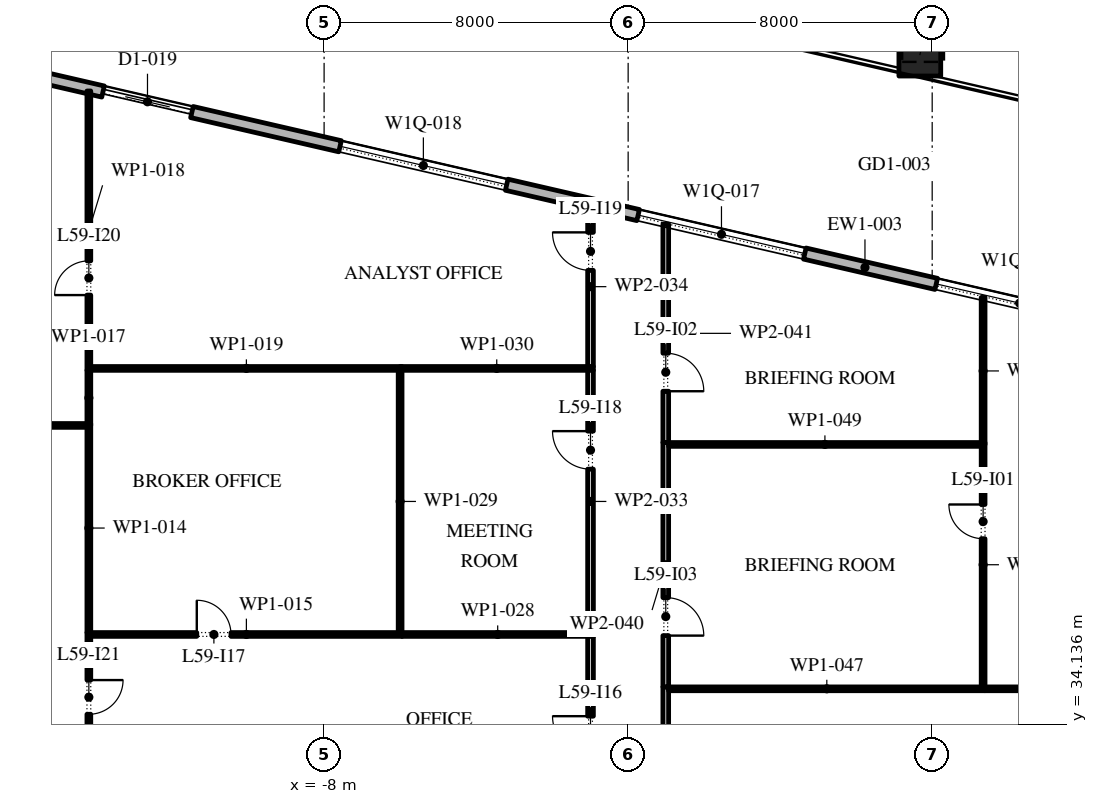
"""IFC4 building model, lengths in metres.
Left out: names, types, materials, properties, quantities, classifications, styles, units other than length and angle.
Written with IfcOpenShell. Run it as: python <this file> out.ifc"""

import sys

from ifc_helpers import new_model, si_unit, direction, frame, frame_2d, origin, origin_2d, place, context, subcontext, project, spatial, rectangle, extrude, element, fill, save


model = new_model("IFC4")
c1 = context("Model", 3, precision=1e-05, world=origin(), true_north=direction((0.0, 1.0)))
c2 = subcontext(c1, "Body", "Model", "MODEL_VIEW")
j1 = project(units=[si_unit("LENGTHUNIT", "METRE"), si_unit("PLANEANGLEUNIT", "RADIAN")], contexts=[c1])
p1 = place(None, origin())
s1 = spatial("IfcSite", under=j1, at=p1, CompositionType="ELEMENT")
p2 = place(p1, origin())
s2 = spatial("IfcBuilding", under=s1, at=p2, CompositionType="ELEMENT")
p3 = place(p2, frame((0.0, 0.0, 272.4)))
s3 = spatial("IfcBuildingStorey", under=s2, at=p3, CompositionType="ELEMENT", Elevation=272.4)
p4 = place(p3, frame((7.675, 51.744, 0.0), z_axis=(0.02037631848, 0.088220197057, 0.99589256573), x_axis=(-0.97434807649, 0.225046274885, 0.0)))
e1 = element("IfcColumn", 1, at=p4, inside=s3, PredefinedType="COLUMN", context=c2, shape_type="SweptSolid", body=[
    extrude(rectangle(XDim=1.1, YDim=1.1, at=origin_2d()), origin(), (0.0, 0.0, 1.0), 4.218),
])
p5 = place(p3, frame((29.616, 40.758, 0.0), z_axis=(0.0, 0.0, 1.0), x_axis=(-0.974370532314, 0.224949029246, 0.0)))
e2 = element("IfcWall", 2, at=p5, inside=s3, PredefinedType="STANDARD", context=c2, shape_type="SweptSolid", body=[
    extrude(rectangle(XDim=48.0, YDim=0.3, at=frame_2d((24.0, 0.0))), origin(), (0.0, 0.0, 1.0), 4.0),
])
p6 = place(p5, frame((1.625, 0.0, 0.45)))
e3 = element("IfcOpeningElement", 3, at=p6, cuts=e2, PredefinedType="OPENING", context=c2, shape_type="SweptSolid", body=[
    extrude(rectangle(XDim=4.5, YDim=2.575, at=frame_2d((2.25, 1.288))), frame((0.0, 0.16, 0.0), z_axis=(0.0, -1.0, 0.0), x_axis=(1.0, 0.0, 0.0)), (0.0, 0.0, 1.0), 0.32),
])
p7 = place(p5, frame((10.575, 0.0, 0.0)))
e4 = element("IfcOpeningElement", 4, at=p7, cuts=e2, PredefinedType="OPENING", context=c2, shape_type="SweptSolid", body=[
    extrude(rectangle(XDim=2.4, YDim=3.5, at=frame_2d((1.2, 1.75))), frame((0.0, 0.16, 0.0), z_axis=(0.0, -1.0, 0.0), x_axis=(1.0, 0.0, 0.0)), (0.0, 0.0, 1.0), 0.32),
])
p8 = place(p5, frame((17.575, 0.0, 0.45)))
e5 = element("IfcOpeningElement", 5, at=p8, cuts=e2, PredefinedType="OPENING", context=c2, shape_type="SweptSolid", body=[
    extrude(rectangle(XDim=4.5, YDim=2.45, at=frame_2d((2.25, 1.225))), frame((0.0, 0.16, 0.0), z_axis=(0.0, -1.0, 0.0), x_axis=(1.0, 0.0, 0.0)), (0.0, 0.0, 1.0), 0.32),
])
p9 = place(p5, frame((25.625, 0.0, 0.45)))
e6 = element("IfcOpeningElement", 6, at=p9, cuts=e2, PredefinedType="OPENING", context=c2, shape_type="SweptSolid", body=[
    extrude(rectangle(XDim=4.5, YDim=2.45, at=frame_2d((2.25, 1.225))), frame((0.0, 0.16, 0.0), z_axis=(0.0, -1.0, 0.0), x_axis=(1.0, 0.0, 0.0)), (0.0, 0.0, 1.0), 0.32),
])
p10 = place(p5, frame((33.675, 0.0, 0.45)))
e7 = element("IfcOpeningElement", 7, at=p10, cuts=e2, PredefinedType="OPENING", context=c2, shape_type="SweptSolid", body=[
    extrude(rectangle(XDim=4.5, YDim=2.45, at=frame_2d((2.25, 1.225))), frame((0.0, 0.16, 0.0), z_axis=(0.0, -1.0, 0.0), x_axis=(1.0, 0.0, 0.0)), (0.0, 0.0, 1.0), 0.32),
])
p11 = place(p5, frame((42.175, 0.0, 0.0)))
e8 = element("IfcOpeningElement", 8, at=p11, cuts=e2, PredefinedType="OPENING", context=c2, shape_type="SweptSolid", body=[
    extrude(rectangle(XDim=2.4, YDim=3.5, at=frame_2d((1.2, 1.75))), frame((0.0, 0.16, 0.0), z_axis=(0.0, -1.0, 0.0), x_axis=(1.0, 0.0, 0.0)), (0.0, 0.0, 1.0), 0.32),
])
p12 = place(p3, frame((-14.19, 30.7, 0.0), z_axis=(0.0, 0.0, 1.0), x_axis=(0.0, 1.0, 0.0)))
e9 = element("IfcWall", 9, at=p12, inside=s3, PredefinedType="PARTITIONING", context=c2, shape_type="SweptSolid", body=[
    extrude(rectangle(XDim=5.85, YDim=0.1, at=frame_2d((2.925, 0.0))), origin(), (0.0, 0.0, 1.0), 4.0),
])
p13 = place(p12, frame((3.7, 0.0, 0.0)))
e10 = element("IfcOpeningElement", 10, at=p13, cuts=e9, PredefinedType="OPENING", context=c2, shape_type="SweptSolid", body=[
    extrude(rectangle(XDim=0.9, YDim=2.1, at=frame_2d((0.45, 1.05))), frame((0.0, 0.06, 0.0), z_axis=(0.0, -1.0, 0.0), x_axis=(1.0, 0.0, 0.0)), (0.0, 0.0, 1.0), 0.12),
])
p14 = place(p3, frame((-14.19, 36.55, 0.0), z_axis=(0.0, 0.0, 1.0), x_axis=(0.0, 1.0, 0.0)))
e11 = element("IfcWall", 11, at=p14, inside=s3, PredefinedType="PARTITIONING", context=c2, shape_type="SweptSolid", body=[
    extrude(rectangle(XDim=5.5, YDim=0.1, at=frame_2d((2.75, 0.0))), origin(), (0.0, 0.0, 1.0), 4.0),
])
p15 = place(p3, frame((-14.14, 36.5, 0.0), z_axis=(0.0, 0.0, 1.0), x_axis=(1.0, 0.0, 0.0)))
e12 = element("IfcWall", 12, at=p15, inside=s3, PredefinedType="PARTITIONING", context=c2, shape_type="SweptSolid", body=[
    extrude(rectangle(XDim=8.19, YDim=0.1, at=frame_2d((4.095, 0.0))), origin(), (0.0, 0.0, 1.0), 4.0),
])
p16 = place(p15, frame((2.79, 0.0, 0.0)))
e13 = element("IfcOpeningElement", 13, at=p16, cuts=e12, PredefinedType="OPENING", context=c2, shape_type="SweptSolid", body=[
    extrude(rectangle(XDim=0.9, YDim=2.1, at=frame_2d((0.45, 1.05))), frame((0.0, 0.06, 0.0), z_axis=(0.0, -1.0, 0.0), x_axis=(1.0, 0.0, 0.0)), (0.0, 0.0, 1.0), 0.12),
])
p17 = place(p3, frame((-14.24, 42.0, 0.0), z_axis=(0.0, 0.0, 1.0), x_axis=(-1.0, 0.0, 0.0)))
e14 = element("IfcWall", 14, at=p17, inside=s3, PredefinedType="PARTITIONING", context=c2, shape_type="SweptSolid", body=[
    extrude(rectangle(XDim=8.589, YDim=0.1, at=frame_2d((4.294, 0.0))), origin(), (0.0, 0.0, 1.0), 4.0),
])
p18 = place(p3, frame((-14.19, 42.0, 0.0), z_axis=(0.0, 0.0, 1.0), x_axis=(0.0, 1.0, 0.0)))
e15 = element("IfcWall", 15, at=p18, inside=s3, PredefinedType="PARTITIONING", context=c2, shape_type="SweptSolid", body=[
    extrude(rectangle(XDim=1.45, YDim=0.1, at=frame_2d((0.725, 0.0))), origin(), (0.0, 0.0, 1.0), 4.0),
])
p19 = place(p3, frame((-14.19, 43.45, 0.0), z_axis=(0.0, 0.0, 1.0), x_axis=(0.0, 1.0, 0.0)))
e16 = element("IfcWall", 16, at=p19, inside=s3, PredefinedType="PARTITIONING", context=c2, shape_type="SweptSolid", body=[
    extrude(rectangle(XDim=7.35, YDim=0.1, at=frame_2d((3.675, 0.0))), origin(), (0.0, 0.0, 1.0), 4.0),
])
p20 = place(p19, frame((1.98, 0.0, 0.0)))
e17 = element("IfcOpeningElement", 17, at=p20, cuts=e16, PredefinedType="OPENING", context=c2, shape_type="SweptSolid", body=[
    extrude(rectangle(XDim=0.9, YDim=2.1, at=frame_2d((0.45, 1.05))), frame((0.0, 0.06, 0.0), z_axis=(0.0, -1.0, 0.0), x_axis=(1.0, 0.0, 0.0)), (0.0, 0.0, 1.0), 0.12),
])
p21 = place(p3, frame((-14.14, 43.5, 0.0), z_axis=(0.0, 0.0, 1.0), x_axis=(1.0, 0.0, 0.0)))
e18 = element("IfcWall", 18, at=p21, inside=s3, PredefinedType="PARTITIONING", context=c2, shape_type="SweptSolid", body=[
    extrude(rectangle(XDim=8.19, YDim=0.1, at=frame_2d((4.095, 0.0))), origin(), (0.0, 0.0, 1.0), 4.0),
])
p22 = place(p3, frame((-5.95, 36.5, 0.0), z_axis=(0.0, 0.0, 1.0), x_axis=(1.0, 0.0, 0.0)))
e19 = element("IfcWall", 19, at=p22, inside=s3, PredefinedType="PARTITIONING", context=c2, shape_type="SweptSolid", body=[
    extrude(rectangle(XDim=5.035, YDim=0.1, at=frame_2d((2.518, 0.0))), origin(), (0.0, 0.0, 1.0), 4.0),
])
p23 = place(p3, frame((-6.0, 43.45, 0.0), z_axis=(0.0, 0.0, 1.0), x_axis=(0.0, -1.0, 0.0)))
e20 = element("IfcWall", 20, at=p23, inside=s3, PredefinedType="PARTITIONING", context=c2, shape_type="SweptSolid", body=[
    extrude(rectangle(XDim=6.9, YDim=0.1, at=frame_2d((3.45, 0.0))), origin(), (0.0, 0.0, 1.0), 4.0),
])
p24 = place(p3, frame((-6.0, 43.5, 0.0), z_axis=(0.0, 0.0, 1.0), x_axis=(1.0, 0.0, 0.0)))
e21 = element("IfcWall", 21, at=p24, inside=s3, PredefinedType="PARTITIONING", context=c2, shape_type="SweptSolid", body=[
    extrude(rectangle(XDim=5.085, YDim=0.1, at=frame_2d((2.542, 0.0))), origin(), (0.0, 0.0, 1.0), 4.0),
])
p25 = place(p3, frame((-0.99, 29.71, 0.0), z_axis=(0.0, 0.0, 1.0), x_axis=(0.0, 1.0, 0.0)))
e22 = element("IfcWall", 22, at=p25, inside=s3, PredefinedType="PARTITIONING", context=c2, shape_type="SweptSolid", body=[
    extrude(rectangle(XDim=6.74, YDim=0.15, at=frame_2d((3.37, 0.0))), origin(), (0.0, 0.0, 1.0), 4.0),
])
p26 = place(p25, frame((3.64, 0.0, 0.0)))
e23 = element("IfcOpeningElement", 23, at=p26, cuts=e22, PredefinedType="OPENING", context=c2, shape_type="SweptSolid", body=[
    extrude(rectangle(XDim=1.0, YDim=2.1, at=frame_2d((0.5, 1.05))), frame((0.0, 0.085, 0.0), z_axis=(0.0, -1.0, 0.0), x_axis=(1.0, 0.0, 0.0)), (0.0, 0.0, 1.0), 0.17),
])
p27 = place(p3, frame((-0.99, 36.55, 0.0), z_axis=(0.0, 0.0, 1.0), x_axis=(0.0, 1.0, 0.0)))
e24 = element("IfcWall", 24, at=p27, inside=s3, PredefinedType="PARTITIONING", context=c2, shape_type="SweptSolid", body=[
    extrude(rectangle(XDim=6.9, YDim=0.15, at=frame_2d((3.45, 0.0))), origin(), (0.0, 0.0, 1.0), 4.0),
])
p28 = place(p27, frame((4.3, 0.0, 0.0)))
e25 = element("IfcOpeningElement", 25, at=p28, cuts=e24, PredefinedType="OPENING", context=c2, shape_type="SweptSolid", body=[
    extrude(rectangle(XDim=1.0, YDim=2.1, at=frame_2d((0.5, 1.05))), frame((0.0, 0.085, 0.0), z_axis=(0.0, -1.0, 0.0), x_axis=(1.0, 0.0, 0.0)), (0.0, 0.0, 1.0), 0.17),
])
p29 = place(p3, frame((-0.99, 43.55, 0.0), z_axis=(0.0, 0.0, 1.0), x_axis=(0.0, 1.0, 0.0)))
e26 = element("IfcWall", 26, at=p29, inside=s3, PredefinedType="PARTITIONING", context=c2, shape_type="SweptSolid", body=[
    extrude(rectangle(XDim=4.203, YDim=0.15, at=frame_2d((2.102, 0.0))), origin(), (0.0, 0.0, 1.0), 4.0),
])
p30 = place(p29, frame((2.53, 0.0, 0.0)))
e27 = element("IfcOpeningElement", 27, at=p30, cuts=e26, PredefinedType="OPENING", context=c2, shape_type="SweptSolid", body=[
    extrude(rectangle(XDim=1.0, YDim=2.1, at=frame_2d((0.5, 1.05))), frame((0.0, 0.085, 0.0), z_axis=(0.0, -1.0, 0.0), x_axis=(1.0, 0.0, 0.0)), (0.0, 0.0, 1.0), 0.17),
])
p31 = place(p3, frame((0.99, 35.12, 0.0), z_axis=(0.0, 0.0, 1.0), x_axis=(0.0, -1.0, 0.0)))
e28 = element("IfcWall", 28, at=p31, inside=s3, PredefinedType="PARTITIONING", context=c2, shape_type="SweptSolid", body=[
    extrude(rectangle(XDim=10.62, YDim=0.15, at=frame_2d((5.31, 0.0))), origin(), (0.0, 0.0, 1.0), 4.0),
])
p32 = place(p31, frame((4.72, 0.0, 0.0)))
e29 = element("IfcOpeningElement", 29, at=p32, cuts=e28, PredefinedType="OPENING", context=c2, shape_type="SweptSolid", body=[
    extrude(rectangle(XDim=1.0, YDim=2.1, at=frame_2d((0.5, 1.05))), frame((0.0, 0.085, 0.0), z_axis=(0.0, -1.0, 0.0), x_axis=(1.0, 0.0, 0.0)), (0.0, 0.0, 1.0), 0.17),
])
p33 = place(p3, frame((0.99, 41.55, 0.0), z_axis=(0.0, 0.0, 1.0), x_axis=(0.0, -1.0, 0.0)))
e30 = element("IfcWall", 30, at=p33, inside=s3, PredefinedType="PARTITIONING", context=c2, shape_type="SweptSolid", body=[
    extrude(rectangle(XDim=6.43, YDim=0.15, at=frame_2d((3.215, 0.0))), origin(), (0.0, 0.0, 1.0), 4.0),
])
p34 = place(p33, frame((4.08, 0.0, 0.0)))
e31 = element("IfcOpeningElement", 31, at=p34, cuts=e30, PredefinedType="OPENING", context=c2, shape_type="SweptSolid", body=[
    extrude(rectangle(XDim=1.0, YDim=2.1, at=frame_2d((0.5, 1.05))), frame((0.0, 0.085, 0.0), z_axis=(0.0, -1.0, 0.0), x_axis=(1.0, 0.0, 0.0)), (0.0, 0.0, 1.0), 0.17),
])
p35 = place(p3, frame((0.99, 47.296, 0.0), z_axis=(0.0, 0.0, 1.0), x_axis=(0.0, -1.0, 0.0)))
e32 = element("IfcWall", 32, at=p35, inside=s3, PredefinedType="PARTITIONING", context=c2, shape_type="SweptSolid", body=[
    extrude(rectangle(XDim=5.746, YDim=0.15, at=frame_2d((2.873, 0.0))), origin(), (0.0, 0.0, 1.0), 4.0),
])
p36 = place(p35, frame((3.396, 0.0, 0.0)))
e33 = element("IfcOpeningElement", 33, at=p36, cuts=e32, PredefinedType="OPENING", context=c2, shape_type="SweptSolid", body=[
    extrude(rectangle(XDim=1.0, YDim=2.1, at=frame_2d((0.5, 1.05))), frame((0.0, 0.085, 0.0), z_axis=(0.0, -1.0, 0.0), x_axis=(1.0, 0.0, 0.0)), (0.0, 0.0, 1.0), 0.17),
])
p37 = place(p3, frame((9.39, 35.07, 0.0), z_axis=(0.0, 0.0, 1.0), x_axis=(-1.0, 0.0, 0.0)))
e34 = element("IfcWall", 34, at=p37, inside=s3, PredefinedType="PARTITIONING", context=c2, shape_type="SweptSolid", body=[
    extrude(rectangle(XDim=8.325, YDim=0.1, at=frame_2d((4.163, 0.0))), origin(), (0.0, 0.0, 1.0), 4.0),
])
p38 = place(p3, frame((9.34, 35.12, 0.0), z_axis=(0.0, 0.0, 1.0), x_axis=(0.0, 1.0, 0.0)))
e35 = element("IfcWall", 35, at=p38, inside=s3, PredefinedType="PARTITIONING", context=c2, shape_type="SweptSolid", body=[
    extrude(rectangle(XDim=6.43, YDim=0.1, at=frame_2d((3.215, 0.0))), origin(), (0.0, 0.0, 1.0), 4.0),
])
p39 = place(p38, frame((3.9, 0.0, 0.0)))
e36 = element("IfcOpeningElement", 36, at=p39, cuts=e35, PredefinedType="OPENING", context=c2, shape_type="SweptSolid", body=[
    extrude(rectangle(XDim=0.9, YDim=2.1, at=frame_2d((0.45, 1.05))), frame((0.0, 0.06, 0.0), z_axis=(0.0, -1.0, 0.0), x_axis=(1.0, 0.0, 0.0)), (0.0, 0.0, 1.0), 0.12),
])
p40 = place(p3, frame((9.29, 41.5, 0.0), z_axis=(0.0, 0.0, 1.0), x_axis=(-1.0, 0.0, 0.0)))
e37 = element("IfcWall", 37, at=p40, inside=s3, PredefinedType="PARTITIONING", context=c2, shape_type="SweptSolid", body=[
    extrude(rectangle(XDim=8.225, YDim=0.1, at=frame_2d((4.113, 0.0))), origin(), (0.0, 0.0, 1.0), 4.0),
])
p41 = place(p3, frame((9.34, 41.5, 0.0), z_axis=(0.0, 0.0, 1.0), x_axis=(0.0, 1.0, 0.0)))
e38 = element("IfcWall", 38, at=p41, inside=s3, PredefinedType="PARTITIONING", context=c2, shape_type="SweptSolid", body=[
    extrude(rectangle(XDim=3.868, YDim=0.1, at=frame_2d((1.934, 0.0))), origin(), (0.0, 0.0, 1.0), 4.0),
])
p42 = place(p3, frame((14.19, 35.07, 0.0), z_axis=(0.0, 0.0, 1.0), x_axis=(-1.0, 0.0, 0.0)))
e39 = element("IfcWall", 39, at=p42, inside=s3, PredefinedType="PARTITIONING", context=c2, shape_type="SweptSolid", body=[
    extrude(rectangle(XDim=4.8, YDim=0.1, at=frame_2d((2.4, 0.0))), origin(), (0.0, 0.0, 1.0), 4.0),
])
p43 = place(p8, origin())
e40 = element("IfcWindow", 40, at=p43, inside=s3, PartitioningType="DOUBLE_PANEL_VERTICAL", PredefinedType="WINDOW", context=c2, shape_type="SweptSolid", body=[
    extrude(rectangle(XDim=4.5, YDim=2.45, at=frame_2d((2.25, 1.225))), frame((0.0, 0.03, 0.0), z_axis=(0.0, -1.0, 0.0), x_axis=(1.0, 0.0, 0.0)), (0.0, 0.0, 1.0), 0.06),
])
fill(e5, e40)
p44 = place(p9, origin())
e41 = element("IfcWindow", 41, at=p44, inside=s3, PartitioningType="DOUBLE_PANEL_VERTICAL", PredefinedType="WINDOW", context=c2, shape_type="SweptSolid", body=[
    extrude(rectangle(XDim=4.5, YDim=2.45, at=frame_2d((2.25, 1.225))), frame((0.0, 0.03, 0.0), z_axis=(0.0, -1.0, 0.0), x_axis=(1.0, 0.0, 0.0)), (0.0, 0.0, 1.0), 0.06),
])
fill(e6, e41)
p45 = place(p10, origin())
e42 = element("IfcWindow", 42, at=p45, inside=s3, PartitioningType="DOUBLE_PANEL_VERTICAL", PredefinedType="WINDOW", context=c2, shape_type="SweptSolid", body=[
    extrude(rectangle(XDim=4.5, YDim=2.45, at=frame_2d((2.25, 1.225))), frame((0.0, 0.03, 0.0), z_axis=(0.0, -1.0, 0.0), x_axis=(1.0, 0.0, 0.0)), (0.0, 0.0, 1.0), 0.06),
])
fill(e7, e42)
p46 = place(p11, origin())
e43 = element("IfcDoor", 43, at=p46, inside=s3, OperationType="DOUBLE_DOOR_SLIDING", PredefinedType="DOOR", context=c2, shape_type="SweptSolid", body=[
    extrude(rectangle(XDim=2.4, YDim=3.5, at=frame_2d((1.2, 1.75))), frame((0.0, 0.025, 0.0), z_axis=(0.0, -1.0, 0.0), x_axis=(1.0, 0.0, 0.0)), (0.0, 0.0, 1.0), 0.05),
])
fill(e8, e43)
p47 = place(p39, origin())
e44 = element("IfcDoor", 44, at=p47, inside=s3, OperationType="SINGLE_SWING_LEFT", PredefinedType="DOOR", context=c2, shape_type="SweptSolid", body=[
    extrude(rectangle(XDim=0.9, YDim=2.1, at=frame_2d((0.45, 1.05))), frame((0.0, 0.025, 0.0), z_axis=(0.0, -1.0, 0.0), x_axis=(1.0, 0.0, 0.0)), (0.0, 0.0, 1.0), 0.05),
])
fill(e36, e44)
p48 = place(p36, origin())
e45 = element("IfcDoor", 45, at=p48, inside=s3, OperationType="SINGLE_SWING_LEFT", PredefinedType="DOOR", context=c2, shape_type="SweptSolid", body=[
    extrude(rectangle(XDim=1.0, YDim=2.1, at=frame_2d((0.5, 1.05))), frame((0.0, 0.025, 0.0), z_axis=(0.0, -1.0, 0.0), x_axis=(1.0, 0.0, 0.0)), (0.0, 0.0, 1.0), 0.05),
])
fill(e33, e45)
p49 = place(p34, origin())
e46 = element("IfcDoor", 46, at=p49, inside=s3, OperationType="SINGLE_SWING_LEFT", PredefinedType="DOOR", context=c2, shape_type="SweptSolid", body=[
    extrude(rectangle(XDim=1.0, YDim=2.1, at=frame_2d((0.5, 1.05))), frame((0.0, 0.025, 0.0), z_axis=(0.0, -1.0, 0.0), x_axis=(1.0, 0.0, 0.0)), (0.0, 0.0, 1.0), 0.05),
])
fill(e31, e46)
p50 = place(p26, origin())
e47 = element("IfcDoor", 47, at=p50, inside=s3, OperationType="SINGLE_SWING_LEFT", PredefinedType="DOOR", context=c2, shape_type="SweptSolid", body=[
    extrude(rectangle(XDim=1.0, YDim=2.1, at=frame_2d((0.5, 1.05))), frame((0.0, 0.025, 0.0), z_axis=(0.0, -1.0, 0.0), x_axis=(1.0, 0.0, 0.0)), (0.0, 0.0, 1.0), 0.05),
])
fill(e23, e47)
p51 = place(p16, origin())
e48 = element("IfcDoor", 48, at=p51, inside=s3, OperationType="SINGLE_SWING_RIGHT", PredefinedType="DOOR", context=c2, shape_type="SweptSolid", body=[
    extrude(rectangle(XDim=0.9, YDim=2.1, at=frame_2d((0.45, 1.05))), frame((0.0, 0.025, 0.0), z_axis=(0.0, -1.0, 0.0), x_axis=(1.0, 0.0, 0.0)), (0.0, 0.0, 1.0), 0.05),
])
fill(e13, e48)
p52 = place(p28, origin())
e49 = element("IfcDoor", 49, at=p52, inside=s3, OperationType="SINGLE_SWING_LEFT", PredefinedType="DOOR", context=c2, shape_type="SweptSolid", body=[
    extrude(rectangle(XDim=1.0, YDim=2.1, at=frame_2d((0.5, 1.05))), frame((0.0, 0.025, 0.0), z_axis=(0.0, -1.0, 0.0), x_axis=(1.0, 0.0, 0.0)), (0.0, 0.0, 1.0), 0.05),
])
fill(e25, e49)
p53 = place(p30, origin())
e50 = element("IfcDoor", 50, at=p53, inside=s3, OperationType="SINGLE_SWING_LEFT", PredefinedType="DOOR", context=c2, shape_type="SweptSolid", body=[
    extrude(rectangle(XDim=1.0, YDim=2.1, at=frame_2d((0.5, 1.05))), frame((0.0, 0.025, 0.0), z_axis=(0.0, -1.0, 0.0), x_axis=(1.0, 0.0, 0.0)), (0.0, 0.0, 1.0), 0.05),
])
fill(e27, e50)
p54 = place(p20, origin())
e51 = element("IfcDoor", 51, at=p54, inside=s3, OperationType="SINGLE_SWING_RIGHT", PredefinedType="DOOR", context=c2, shape_type="SweptSolid", body=[
    extrude(rectangle(XDim=0.9, YDim=2.1, at=frame_2d((0.45, 1.05))), frame((0.0, 0.025, 0.0), z_axis=(0.0, -1.0, 0.0), x_axis=(1.0, 0.0, 0.0)), (0.0, 0.0, 1.0), 0.05),
])
fill(e17, e51)
p55 = place(p13, frame((0.9, 0.0, 0.0), z_axis=(0.0, 0.0, 1.0), x_axis=(-1.0, 0.0, 0.0)))
e52 = element("IfcDoor", 52, at=p55, inside=s3, OperationType="SINGLE_SWING_RIGHT", PredefinedType="DOOR", context=c2, shape_type="SweptSolid", body=[
    extrude(rectangle(XDim=0.9, YDim=2.1, at=frame_2d((0.45, 1.05))), frame((0.0, 0.025, 0.0), z_axis=(0.0, -1.0, 0.0), x_axis=(1.0, 0.0, 0.0)), (0.0, 0.0, 1.0), 0.05),
])
fill(e10, e52)
save(model, sys.argv[1])
